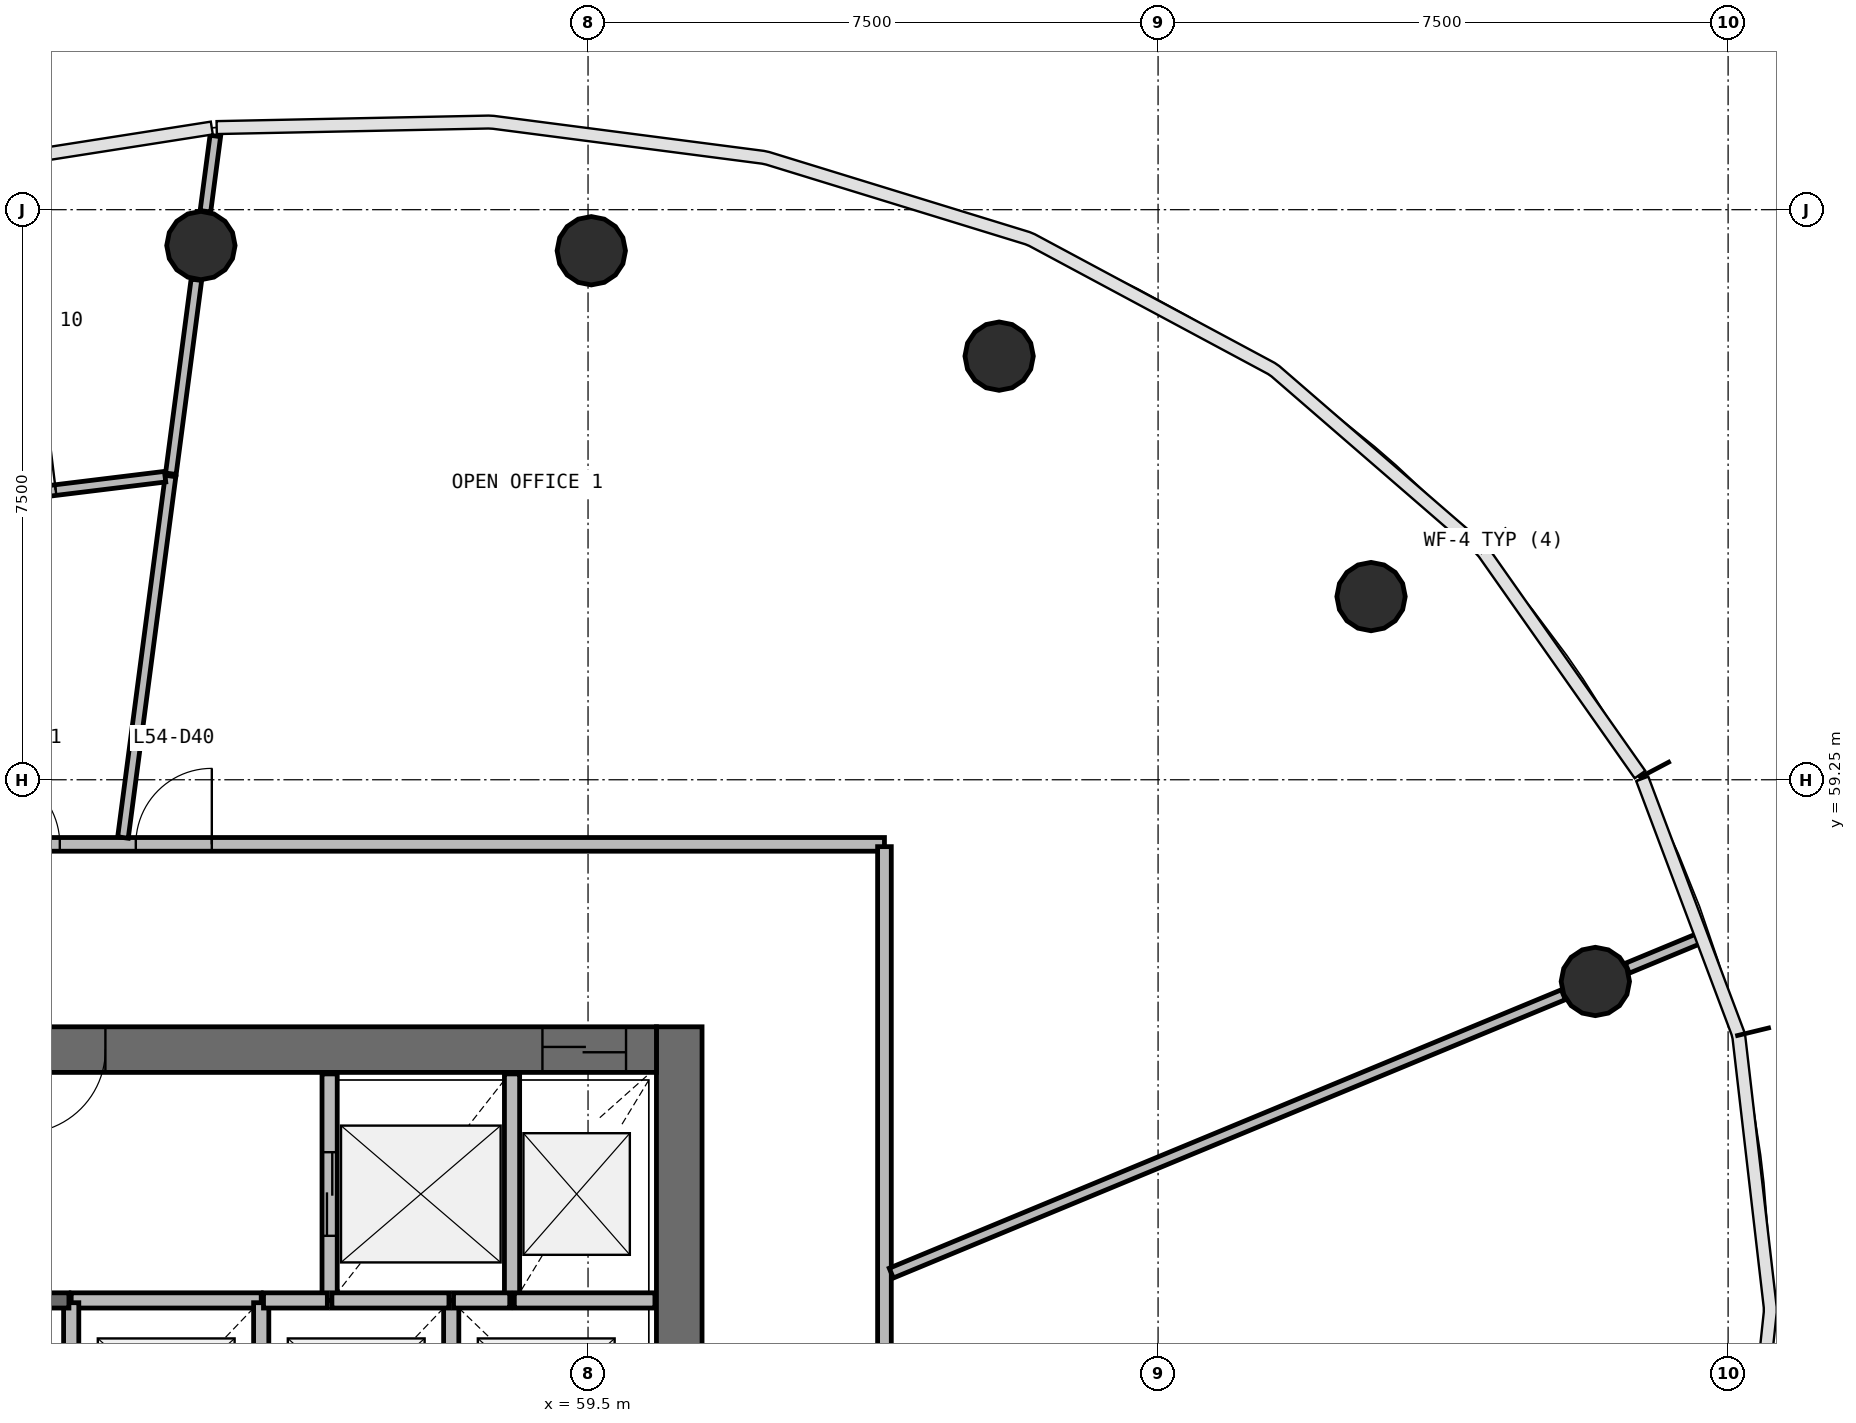
"""IFC4 building model, lengths in metres.
Left out: names, types, materials, properties, quantities, classifications, styles, units other than length and angle.
Written with IfcOpenShell. Run it as: python <this file> out.ifc"""

import sys

from ifc_helpers import new_model, si_unit, direction, frame, frame_2d, origin, origin_2d, place, context, subcontext, project, spatial, rectangle, circle, extrude, source, transform, mapped, element, fill, save


model = new_model("IFC4")
c1 = context("Model", 3, precision=1e-05, world=origin(), true_north=direction((0.0, 1.0)))
c2 = subcontext(c1, "Body", "Model", "MODEL_VIEW")
j1 = project(units=[si_unit("LENGTHUNIT", "METRE"), si_unit("PLANEANGLEUNIT", "RADIAN")], contexts=[c1])
p1 = place(None, origin())
s1 = spatial("IfcSite", under=j1, at=p1, CompositionType="ELEMENT")
p2 = place(p1, origin())
s2 = spatial("IfcBuilding", under=s1, at=p2, CompositionType="ELEMENT")
p3 = place(p2, frame((0.0, 0.0, 222.8)))
s3 = spatial("IfcBuildingStorey", under=s2, at=p3, CompositionType="ELEMENT", Elevation=222.8)
p4 = place(p3, frame((60.7, 40.0, 0.0), z_axis=(0.0, 0.0, 1.0), x_axis=(0.0, 1.0, 0.0)))
e1 = element("IfcWall", 1, at=p4, inside=s3, PredefinedType="SHEAR", context=c2, shape_type="SweptSolid", body=[
    extrude(rectangle(XDim=16.0, YDim=0.6, at=frame_2d((8.0, 0.0))), origin(), (0.0, 0.0, 1.0), 3.9),
])
p5 = place(p4, frame((7.1, 0.0, 0.0)))
e2 = element("IfcOpeningElement", 2, at=p5, cuts=e1, PredefinedType="OPENING", context=c2, shape_type="SweptSolid", body=[
    extrude(rectangle(XDim=1.8, YDim=2.1, at=frame_2d((0.9, 1.05))), frame((0.0, 0.31, 0.0), z_axis=(0.0, -1.0, 0.0), x_axis=(1.0, 0.0, 0.0)), (0.0, 0.0, 1.0), 0.62),
])
p6 = place(p3, frame((60.4, 55.7, 0.0), z_axis=(0.0, 0.0, 1.0), x_axis=(-1.0, 0.0, 0.0)))
e3 = element("IfcWall", 3, at=p6, inside=s3, PredefinedType="SHEAR", context=c2, shape_type="SweptSolid", body=[
    extrude(rectangle(XDim=16.8, YDim=0.6, at=frame_2d((8.4, 0.0))), origin(), (0.0, 0.0, 1.0), 3.9),
])
p7 = place(p6, frame((0.4, 0.0, 0.0)))
e4 = element("IfcOpeningElement", 4, at=p7, cuts=e3, PredefinedType="OPENING", context=c2, shape_type="SweptSolid", body=[
    extrude(rectangle(XDim=1.1, YDim=2.1, at=frame_2d((0.55, 1.05))), frame((0.0, 0.31, 0.0), z_axis=(0.0, -1.0, 0.0), x_axis=(1.0, 0.0, 0.0)), (0.0, 0.0, 1.0), 0.62),
])
p8 = place(p6, frame((10.3, 0.0, 0.0)))
e5 = element("IfcOpeningElement", 5, at=p8, cuts=e3, PredefinedType="OPENING", context=c2, shape_type="SweptSolid", body=[
    extrude(rectangle(XDim=1.2, YDim=2.1, at=frame_2d((0.6, 1.05))), frame((0.0, 0.31, 0.0), z_axis=(0.0, -1.0, 0.0), x_axis=(1.0, 0.0, 0.0)), (0.0, 0.0, 1.0), 0.62),
])
p9 = place(p6, frame((7.25, 0.0, 0.0)))
e6 = element("IfcOpeningElement", 6, at=p9, cuts=e3, PredefinedType="OPENING", context=c2, shape_type="SweptSolid", body=[
    extrude(rectangle(XDim=1.1, YDim=2.1, at=frame_2d((0.55, 1.05))), frame((0.0, 0.31, 0.0), z_axis=(0.0, -1.0, 0.0), x_axis=(1.0, 0.0, 0.0)), (0.0, 0.0, 1.0), 0.62),
])
m1 = source(origin(), c2, "Body", "SweptSolid", [
    extrude(circle(Radius=0.45, at=origin_2d()), origin(), (0.0, 0.0, 1.0), 3.9),
])
for number, where, z_axis, x_axis in (
    (7, (72.753, 56.596, 0.0), (0.0, 0.0, 1.0), (1.0, 0.0, 0.0)),
    (8, (69.802, 61.66, 0.0), (0.0, 0.0, 1.0), (1.0, 0.0, 0.0)),
    (9, (64.909, 64.823, 0.0), (0.0, 0.0, 1.0), (1.0, 0.0, 0.0)),
    (10, (59.543, 66.21, 0.0), (0.0, 0.0, 1.0), (1.0, 0.0, 0.0)),
    (11, (54.406, 66.278, 0.0), (0.0, 0.0, 1.0), (1.0, 0.0, 0.0)),
):
    element("IfcColumn", number, at=place(p3, frame(where, z_axis=z_axis, x_axis=x_axis)), inside=s3, PredefinedType="COLUMN", context=c2, shape_type="MappedRepresentation", body=[
        mapped(m1, transform((0.0, 0.0, 0.0), scale=1.0)),
    ])
p10 = place(p3, frame((56.1, 55.38, 0.0), z_axis=(0.0, 0.0, 1.0), x_axis=(0.0, -1.0, 0.0)))
e12 = element("IfcWall", 12, at=p10, inside=s3, PredefinedType="SOLIDWALL", context=c2, shape_type="SweptSolid", body=[
    extrude(rectangle(XDim=2.98, YDim=0.2, at=frame_2d((1.49, 0.0))), origin(), (0.0, 0.0, 1.0), 3.58),
])
p11 = place(p10, frame((1.03, 0.0, 0.0)))
e13 = element("IfcOpeningElement", 13, at=p11, cuts=e12, PredefinedType="OPENING", context=c2, shape_type="SweptSolid", body=[
    extrude(rectangle(XDim=1.1, YDim=2.1, at=frame_2d((0.55, 1.05))), frame((0.0, 0.11, 0.0), z_axis=(0.0, -1.0, 0.0), x_axis=(1.0, 0.0, 0.0)), (0.0, 0.0, 1.0), 0.22),
])
p12 = place(p3, frame((58.5, 52.4, 0.0), z_axis=(0.0, 0.0, 1.0), x_axis=(0.0, 1.0, 0.0)))
e14 = element("IfcWall", 14, at=p12, inside=s3, PredefinedType="SOLIDWALL", context=c2, shape_type="SweptSolid", body=[
    extrude(rectangle(XDim=2.98, YDim=0.2, at=frame_2d((1.49, 0.0))), origin(), (0.0, 0.0, 1.0), 3.58),
])
p13 = place(p3, frame((55.2, 52.4, 0.0), z_axis=(0.0, 0.0, 1.0), x_axis=(-1.0, 0.0, 0.0)))
e15 = element("IfcWall", 15, at=p13, inside=s3, PredefinedType="SOLIDWALL", context=c2, shape_type="SweptSolid", body=[
    extrude(rectangle(XDim=2.5, YDim=0.2, at=frame_2d((1.25, 0.0))), origin(), (0.0, 0.0, 1.0), 3.58),
])
for number, where, z_axis, x_axis in (
    (16, (52.7, 52.37, 0.0), (0.0, 0.0, 1.0), (0.0, -1.0, 0.0)),
    (17, (55.2, 50.01, 0.0), (0.0, 0.0, 1.0), (0.0, 1.0, 0.0)),
):
    element("IfcWall", number, at=place(p3, frame(where, z_axis=z_axis, x_axis=x_axis)), inside=s3, PredefinedType="SOLIDWALL", context=c2, shape_type="SweptSolid", body=[
        extrude(rectangle(XDim=2.36, YDim=0.2, at=frame_2d((1.18, 0.0))), origin(), (0.0, 0.0, 1.0), 3.58),
    ])
p14 = place(p3, frame((57.7, 50.01, 0.0), z_axis=(0.0, 0.0, 1.0), x_axis=(0.0, 1.0, 0.0)))
e18 = element("IfcWall", 18, at=p14, inside=s3, PredefinedType="SOLIDWALL", context=c2, shape_type="SweptSolid", body=[
    extrude(rectangle(XDim=2.39, YDim=0.2, at=frame_2d((1.195, 0.0))), origin(), (0.0, 0.0, 1.0), 3.58),
])
p15 = place(p3, frame((50.43, 52.4, 0.0), z_axis=(0.0, 0.0, 1.0), x_axis=(1.0, 0.0, 0.0)))
e19 = element("IfcWall", 19, at=p15, inside=s3, PredefinedType="SOLIDWALL", context=c2, shape_type="SweptSolid", body=[
    extrude(rectangle(XDim=2.24, YDim=0.2, at=frame_2d((1.12, 0.0))), origin(), (0.0, 0.0, 1.0), 3.58),
])
p16 = place(p3, frame((60.38, 52.4, 0.0), z_axis=(0.0, 0.0, 1.0), x_axis=(-1.0, 0.0, 0.0)))
e20 = element("IfcWall", 20, at=p16, inside=s3, PredefinedType="SOLIDWALL", context=c2, shape_type="SweptSolid", body=[
    extrude(rectangle(XDim=1.85, YDim=0.2, at=frame_2d((0.925, 0.0))), origin(), (0.0, 0.0, 1.0), 3.58),
])
p17 = place(p3, frame((57.67, 52.4, 0.0), z_axis=(0.0, 0.0, 1.0), x_axis=(-1.0, 0.0, 0.0)))
e21 = element("IfcWall", 21, at=p17, inside=s3, PredefinedType="SOLIDWALL", context=c2, shape_type="SweptSolid", body=[
    extrude(rectangle(XDim=1.54, YDim=0.2, at=frame_2d((0.77, 0.0))), origin(), (0.0, 0.0, 1.0), 3.58),
])
p18 = place(p3, frame((56.07, 52.4, 0.0), z_axis=(0.0, 0.0, 1.0), x_axis=(-1.0, 0.0, 0.0)))
e22 = element("IfcWall", 22, at=p18, inside=s3, PredefinedType="SOLIDWALL", context=c2, shape_type="SweptSolid", body=[
    extrude(rectangle(XDim=0.84, YDim=0.2, at=frame_2d((0.42, 0.0))), origin(), (0.0, 0.0, 1.0), 3.58),
])
p19 = place(p3, frame((58.47, 52.4, 0.0), z_axis=(0.0, 0.0, 1.0), x_axis=(-1.0, 0.0, 0.0)))
e23 = element("IfcWall", 23, at=p19, inside=s3, PredefinedType="SOLIDWALL", context=c2, shape_type="SweptSolid", body=[
    extrude(rectangle(XDim=0.74, YDim=0.2, at=frame_2d((0.37, 0.0))), origin(), (0.0, 0.0, 1.0), 3.58),
])
p20 = place(p3, frame((40.6, 58.4, 0.0), z_axis=(0.0, 0.0, 1.0), x_axis=(1.0, 0.0, 0.0)))
e24 = element("IfcWall", 24, at=p20, inside=s3, PredefinedType="PARTITIONING", context=c2, shape_type="SweptSolid", body=[
    extrude(rectangle(XDim=22.8, YDim=0.18, at=frame_2d((11.4, 0.0))), origin(), (0.0, 0.0, 1.0), 2.88),
])
p21 = place(p20, frame((2.05, 0.0, 0.0)))
e25 = element("IfcOpeningElement", 25, at=p21, cuts=e24, PredefinedType="OPENING", context=c2, shape_type="SweptSolid", body=[
    extrude(rectangle(XDim=0.9, YDim=2.1, at=frame_2d((0.45, 1.05))), frame((0.0, 0.1, 0.0), z_axis=(0.0, -1.0, 0.0), x_axis=(1.0, 0.0, 0.0)), (0.0, 0.0, 1.0), 0.2),
])
p22 = place(p20, frame((12.95, 0.0, 0.0)))
e26 = element("IfcOpeningElement", 26, at=p22, cuts=e24, PredefinedType="OPENING", context=c2, shape_type="SweptSolid", body=[
    extrude(rectangle(XDim=1.0, YDim=2.1, at=frame_2d((0.5, 1.05))), frame((0.0, 0.1, 0.0), z_axis=(0.0, -1.0, 0.0), x_axis=(1.0, 0.0, 0.0)), (0.0, 0.0, 1.0), 0.2),
])
p23 = place(p20, frame((10.95, 0.0, 0.0)))
e27 = element("IfcOpeningElement", 27, at=p23, cuts=e24, PredefinedType="OPENING", context=c2, shape_type="SweptSolid", body=[
    extrude(rectangle(XDim=1.0, YDim=2.1, at=frame_2d((0.5, 1.05))), frame((0.0, 0.1, 0.0), z_axis=(0.0, -1.0, 0.0), x_axis=(1.0, 0.0, 0.0)), (0.0, 0.0, 1.0), 0.2),
])
p24 = place(p3, frame((63.4, 58.37, 0.0), z_axis=(0.0, 0.0, 1.0), x_axis=(0.0, -1.0, 0.0)))
e28 = element("IfcWall", 28, at=p24, inside=s3, PredefinedType="PARTITIONING", context=c2, shape_type="SweptSolid", body=[
    extrude(rectangle(XDim=20.74, YDim=0.18, at=frame_2d((10.37, 0.0))), origin(), (0.0, 0.0, 1.0), 2.88),
])
p25 = place(p24, frame((12.09, 0.0, 0.0)))
e29 = element("IfcOpeningElement", 29, at=p25, cuts=e28, PredefinedType="OPENING", context=c2, shape_type="SweptSolid", body=[
    extrude(rectangle(XDim=1.0, YDim=2.1, at=frame_2d((0.5, 1.05))), frame((0.0, 0.1, 0.0), z_axis=(0.0, -1.0, 0.0), x_axis=(1.0, 0.0, 0.0)), (0.0, 0.0, 1.0), 0.2),
])
p26 = place(p24, frame((9.89, 0.0, 0.0)))
e30 = element("IfcOpeningElement", 30, at=p26, cuts=e28, PredefinedType="OPENING", context=c2, shape_type="SweptSolid", body=[
    extrude(rectangle(XDim=1.0, YDim=2.1, at=frame_2d((0.5, 1.05))), frame((0.0, 0.1, 0.0), z_axis=(0.0, -1.0, 0.0), x_axis=(1.0, 0.0, 0.0)), (0.0, 0.0, 1.0), 0.2),
])
p27 = place(p3, frame((63.49, 52.759, 0.0), z_axis=(0.0, 0.0, 1.0), x_axis=(0.923877866197, 0.382687455178, 0.0)))
e31 = element("IfcWall", 31, at=p27, inside=s3, PredefinedType="PARTITIONING", context=c2, shape_type="SweptSolid", body=[
    extrude(rectangle(XDim=9.571, YDim=0.14, at=frame_2d((4.786, 0.0))), origin(), (0.0, 0.0, 1.0), 2.88),
])
p28 = place(p3, frame((53.381, 58.49, 0.0), z_axis=(0.0, 0.0, 1.0), x_axis=(0.130490058015, 0.991449617862, 0.0)))
e32 = element("IfcWall", 32, at=p28, inside=s3, PredefinedType="PARTITIONING", context=c2, shape_type="SweptSolid", body=[
    extrude(rectangle(XDim=4.797, YDim=0.14, at=frame_2d((2.398, 0.0))), origin(), (0.0, 0.0, 1.0), 2.88),
])
p29 = place(p3, frame((50.056, 62.762, 0.0), z_axis=(0.0, 0.0, 1.0), x_axis=(0.99258238902, 0.121573850015, 0.0)))
e33 = element("IfcWall", 33, at=p29, inside=s3, PredefinedType="PARTITIONING", context=c2, shape_type="SweptSolid", body=[
    extrude(rectangle(XDim=3.908, YDim=0.14, at=frame_2d((1.954, 0.0))), origin(), (0.0, 0.0, 1.0), 2.88),
])
p30 = place(p29, frame((1.458, 0.0, 0.0)))
e34 = element("IfcOpeningElement", 34, at=p30, cuts=e33, PredefinedType="OPENING", context=c2, shape_type="SweptSolid", body=[
    extrude(rectangle(XDim=1.0, YDim=2.1, at=frame_2d((0.5, 1.05))), frame((0.0, 0.08, 0.0), z_axis=(0.0, -1.0, 0.0), x_axis=(1.0, 0.0, 0.0)), (0.0, 0.0, 1.0), 0.16),
])
p31 = place(p3, frame((54.011, 63.276, 0.0), z_axis=(0.0, 0.0, 1.0), x_axis=(0.130616456633, 0.991432973658, 0.0)))
e35 = element("IfcWall", 35, at=p31, inside=s3, PredefinedType="PARTITIONING", context=c2, shape_type="SweptSolid", body=[
    extrude(rectangle(XDim=2.574, YDim=0.14, at=frame_2d((1.287, 0.0))), origin(), (0.0, 0.0, 1.0), 2.88),
])
p32 = place(p3, frame((73.174, 56.77, 0.0), z_axis=(0.0, 0.0, 1.0), x_axis=(0.92384548676, 0.382765615741, 0.0)))
e36 = element("IfcWall", 36, at=p32, inside=s3, PredefinedType="PARTITIONING", context=c2, shape_type="SweptSolid", body=[
    extrude(rectangle(XDim=1.059, YDim=0.14, at=frame_2d((0.53, 0.0))), origin(), (0.0, 0.0, 1.0), 2.88),
])
p33 = place(p3, frame((54.466, 66.729, 0.0), z_axis=(0.0, 0.0, 1.0), x_axis=(0.130498763634, 0.99144847203, 0.0)))
e37 = element("IfcWall", 37, at=p33, inside=s3, PredefinedType="PARTITIONING", context=c2, shape_type="SweptSolid", body=[
    extrude(rectangle(XDim=0.999, YDim=0.14, at=frame_2d((0.5, 0.0))), origin(), (0.0, 0.0, 1.0), 2.88),
])
m2 = source(origin(), c2, "Body", "SweptSolid", [
    extrude(rectangle(XDim=1.1, YDim=2.1, at=frame_2d((0.55, 1.05))), frame((0.0, 0.025, 0.0), z_axis=(0.0, -1.0, 0.0), x_axis=(1.0, 0.0, 0.0)), (0.0, 0.0, 1.0), 0.05),
])
p34 = place(p11, origin())
e38 = element("IfcDoor", 38, at=p34, inside=s3, OperationType="DOUBLE_DOOR_SLIDING", PredefinedType="USERDEFINED", context=c2, shape_type="MappedRepresentation", body=[
    mapped(m2, transform((0.0, 0.0, 0.0), scale=1.0)),
])
fill(e13, e38)
p35 = place(p7, origin())
e39 = element("IfcDoor", 39, at=p35, inside=s3, OperationType="DOUBLE_DOOR_SLIDING", PredefinedType="USERDEFINED", context=c2, shape_type="MappedRepresentation", body=[
    mapped(m2, transform((0.0, 0.0, 0.0), scale=1.0)),
])
fill(e4, e39)
m3 = source(origin(), c2, "Body", "SweptSolid", [
    extrude(rectangle(XDim=1.1, YDim=2.1, at=frame_2d((0.55, 1.05))), frame((0.0, 0.025, 0.0), z_axis=(0.0, -1.0, 0.0), x_axis=(1.0, 0.0, 0.0)), (0.0, 0.0, 1.0), 0.05),
])
p36 = place(p9, origin())
e40 = element("IfcDoor", 40, at=p36, inside=s3, OperationType="SINGLE_SWING_RIGHT", PredefinedType="DOOR", context=c2, shape_type="MappedRepresentation", body=[
    mapped(m3, transform((0.0, 0.0, 0.0), scale=1.0)),
])
fill(e6, e40)
m4 = source(origin(), c2, "Body", "SweptSolid", [
    extrude(rectangle(XDim=1.0, YDim=2.1, at=frame_2d((0.5, 1.05))), frame((0.0, 0.025, 0.0), z_axis=(0.0, -1.0, 0.0), x_axis=(1.0, 0.0, 0.0)), (0.0, 0.0, 1.0), 0.05),
])
p37 = place(p22, origin())
e41 = element("IfcDoor", 41, at=p37, inside=s3, OperationType="SINGLE_SWING_RIGHT", PredefinedType="DOOR", context=c2, shape_type="MappedRepresentation", body=[
    mapped(m4, transform((0.0, 0.0, 0.0), scale=1.0)),
])
fill(e26, e41)
p38 = place(p23, origin())
e42 = element("IfcDoor", 42, at=p38, inside=s3, OperationType="SINGLE_SWING_LEFT", PredefinedType="DOOR", context=c2, shape_type="MappedRepresentation", body=[
    mapped(m4, transform((0.0, 0.0, 0.0), scale=1.0)),
])
fill(e27, e42)
p39 = place(p30, origin())
e43 = element("IfcDoor", 43, at=p39, inside=s3, OperationType="SINGLE_SWING_RIGHT", PredefinedType="DOOR", context=c2, shape_type="MappedRepresentation", body=[
    mapped(m4, transform((0.0, 0.0, 0.0), scale=1.0)),
])
fill(e34, e43)
save(model, sys.argv[1])
